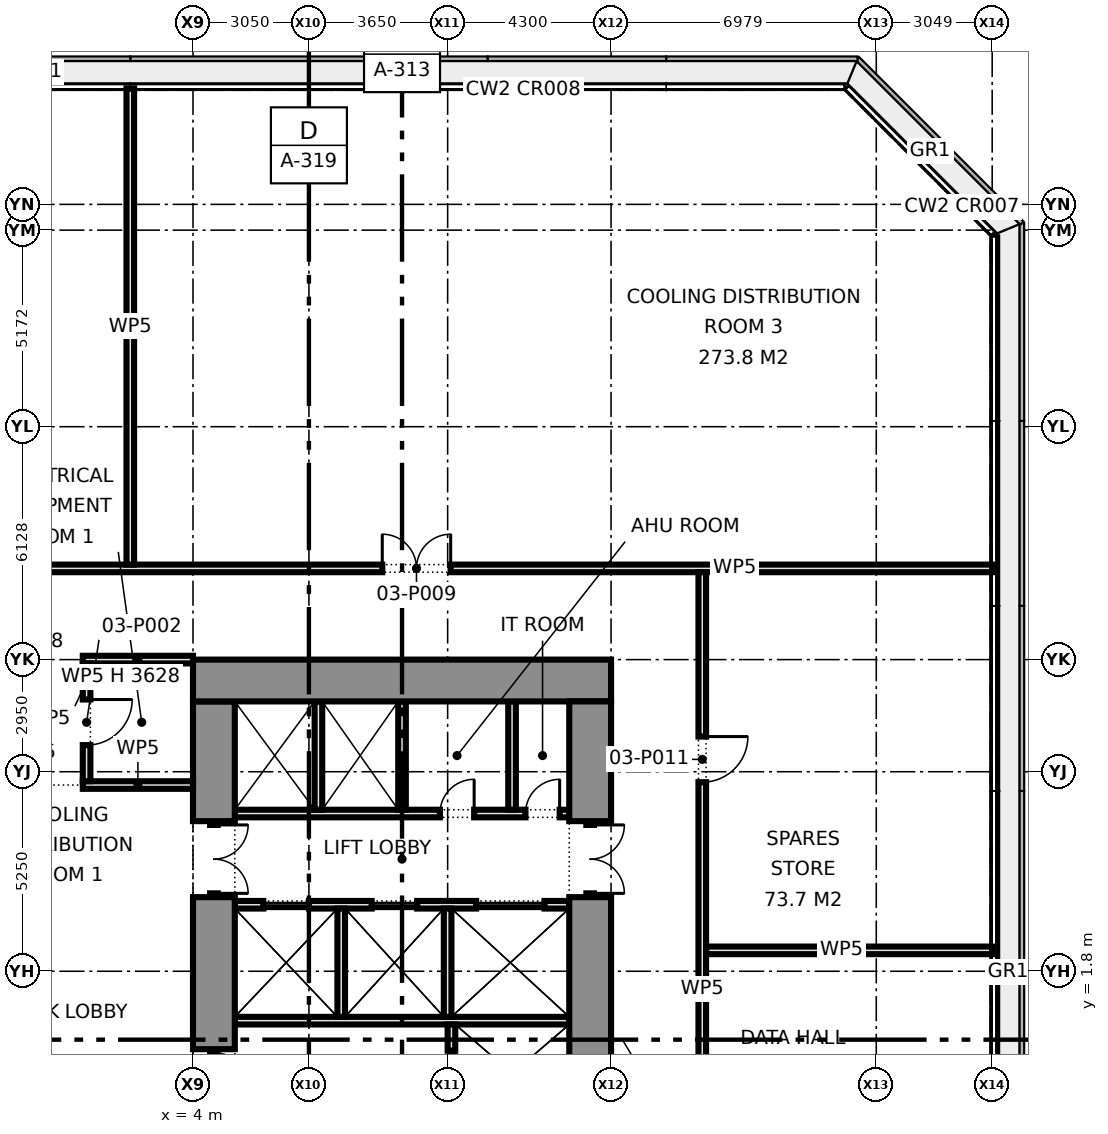
"""IFC4 building model, lengths in metres.
Left out: names, types, materials, properties, quantities, classifications, styles, units other than length and angle.
Written with IfcOpenShell. Run it as: python <this file> out.ifc"""

import sys

from ifc_helpers import new_model, si_unit, direction, frame, frame_2d, origin, place, context, subcontext, project, spatial, rectangle, extrude, element, fill, save


model = new_model("IFC4")
c1 = context("Model", 3, precision=1e-05, world=origin(), true_north=direction((0.0, 1.0)))
c2 = subcontext(c1, "Body", "Model", "MODEL_VIEW")
j1 = project(units=[si_unit("LENGTHUNIT", "METRE"), si_unit("PLANEANGLEUNIT", "RADIAN")], contexts=[c1])
p1 = place(None, origin())
s1 = spatial("IfcSite", under=j1, at=p1, CompositionType="ELEMENT")
p2 = place(p1, origin())
s2 = spatial("IfcBuilding", under=s1, at=p2, CompositionType="ELEMENT")
p3 = place(p2, frame((0.0, 0.0, 11.3)))
s3 = spatial("IfcBuildingStorey", under=s2, at=p3, CompositionType="ELEMENT", Elevation=11.3)
p4 = place(p3, frame((15.0, 9.45, 0.0), z_axis=(0.0, 0.0, 1.0), x_axis=(-1.0, 0.0, 0.0)))
e1 = element("IfcWall", 1, at=p4, inside=s3, PredefinedType="SHEAR", context=c2, shape_type="SweptSolid", body=[
    extrude(rectangle(XDim=11.0, YDim=1.1, at=frame_2d((5.5, 0.0))), origin(), (0.0, 0.0, 1.0), 4.575),
])
p5 = place(p3, frame((14.45, 8.9, 0.0), z_axis=(0.0, 0.0, 1.0), x_axis=(0.0, -1.0, 0.0)))
e2 = element("IfcWall", 2, at=p5, inside=s3, PredefinedType="SHEAR", context=c2, shape_type="SweptSolid", body=[
    extrude(rectangle(XDim=3.15, YDim=1.1, at=frame_2d((1.575, 0.0))), origin(), (0.0, 0.0, 1.0), 4.575),
])
p6 = place(p3, frame((14.45, 5.75, 0.0), z_axis=(0.0, 0.0, 1.0), x_axis=(0.0, -1.0, 0.0)))
e3 = element("IfcWall", 3, at=p6, inside=s3, PredefinedType="PARTITIONING", context=c2, shape_type="SweptSolid", body=[
    extrude(rectangle(XDim=2.0, YDim=0.2, at=frame_2d((1.0, 0.0))), origin(), (0.0, 0.0, 1.0), 2.4),
])
p7 = place(p6, frame((0.1, 0.0, 0.0)))
e4 = element("IfcOpeningElement", 4, at=p7, cuts=e3, PredefinedType="OPENING", context=c2, shape_type="SweptSolid", body=[
    extrude(rectangle(XDim=1.8, YDim=2.1, at=frame_2d((0.9, 1.05))), frame((0.0, 0.11, 0.0), z_axis=(0.0, -1.0, 0.0), x_axis=(1.0, 0.0, 0.0)), (0.0, 0.0, 1.0), 0.22),
])
p8 = place(p3, frame((14.45, 3.75, 0.0), z_axis=(0.0, 0.0, 1.0), x_axis=(0.0, -1.0, 0.0)))
e5 = element("IfcWall", 5, at=p8, inside=s3, PredefinedType="SHEAR", context=c2, shape_type="SweptSolid", body=[
    extrude(rectangle(XDim=6.13, YDim=1.1, at=frame_2d((3.065, 0.0))), origin(), (0.0, 0.0, 1.0), 4.575),
])
p9 = place(p3, frame((4.55, 8.9, 0.0), z_axis=(0.0, 0.0, 1.0), x_axis=(0.0, -1.0, 0.0)))
e6 = element("IfcWall", 6, at=p9, inside=s3, PredefinedType="SHEAR", context=c2, shape_type="SweptSolid", body=[
    extrude(rectangle(XDim=3.15, YDim=1.1, at=frame_2d((1.575, 0.0))), origin(), (0.0, 0.0, 1.0), 4.575),
])
p10 = place(p3, frame((4.55, 5.75, 0.0), z_axis=(0.0, 0.0, 1.0), x_axis=(0.0, -1.0, 0.0)))
e7 = element("IfcWall", 7, at=p10, inside=s3, PredefinedType="PARTITIONING", context=c2, shape_type="SweptSolid", body=[
    extrude(rectangle(XDim=2.0, YDim=0.2, at=frame_2d((1.0, 0.0))), origin(), (0.0, 0.0, 1.0), 2.4),
])
p11 = place(p10, frame((0.1, 0.0, 0.0)))
e8 = element("IfcOpeningElement", 8, at=p11, cuts=e7, PredefinedType="OPENING", context=c2, shape_type="SweptSolid", body=[
    extrude(rectangle(XDim=1.8, YDim=2.1, at=frame_2d((0.9, 1.05))), frame((0.0, 0.11, 0.0), z_axis=(0.0, -1.0, 0.0), x_axis=(1.0, 0.0, 0.0)), (0.0, 0.0, 1.0), 0.22),
])
p12 = place(p3, frame((4.55, 3.75, 0.0), z_axis=(0.0, 0.0, 1.0), x_axis=(0.0, -1.0, 0.0)))
e9 = element("IfcWall", 9, at=p12, inside=s3, PredefinedType="SHEAR", context=c2, shape_type="SweptSolid", body=[
    extrude(rectangle(XDim=4.0, YDim=1.1, at=frame_2d((2.0, 0.0))), origin(), (0.0, 0.0, 1.0), 4.575),
])
p13 = place(p3, frame((4.55, -0.25, 0.0), z_axis=(0.0, 0.0, 1.0), x_axis=(0.0, -1.0, 0.0)))
e10 = element("IfcWall", 10, at=p13, inside=s3, PredefinedType="PARTITIONING", context=c2, shape_type="SweptSolid", body=[
    extrude(rectangle(XDim=1.3, YDim=0.2, at=frame_2d((0.65, 0.0))), origin(), (0.0, 0.0, 1.0), 2.4),
])
p14 = place(p13, frame((0.1, 0.0, 0.0)))
e11 = element("IfcOpeningElement", 11, at=p14, cuts=e10, PredefinedType="OPENING", context=c2, shape_type="SweptSolid", body=[
    extrude(rectangle(XDim=1.1, YDim=2.1, at=frame_2d((0.55, 1.05))), frame((0.0, 0.11, 0.0), z_axis=(0.0, -1.0, 0.0), x_axis=(1.0, 0.0, 0.0)), (0.0, 0.0, 1.0), 0.22),
])
p15 = place(p3, frame((13.9, 5.95, 0.0), z_axis=(0.0, 0.0, 1.0), x_axis=(-1.0, 0.0, 0.0)))
e12 = element("IfcWall", 12, at=p15, inside=s3, PredefinedType="PARTITIONING", context=c2, shape_type="SweptSolid", body=[
    extrude(rectangle(XDim=8.8, YDim=0.2, at=frame_2d((4.4, 0.0))), origin(), (0.0, 0.0, 1.0), 4.575),
])
p16 = place(p15, frame((0.252, 0.0, 0.0)))
e13 = element("IfcOpeningElement", 13, at=p16, cuts=e12, PredefinedType="OPENING", context=c2, shape_type="SweptSolid", body=[
    extrude(rectangle(XDim=0.9, YDim=2.1, at=frame_2d((0.45, 1.05))), frame((0.0, 0.11, 0.0), z_axis=(0.0, -1.0, 0.0), x_axis=(1.0, 0.0, 0.0)), (0.0, 0.0, 1.0), 0.22),
])
p17 = place(p15, frame((2.502, 0.0, 0.0)))
e14 = element("IfcOpeningElement", 14, at=p17, cuts=e12, PredefinedType="OPENING", context=c2, shape_type="SweptSolid", body=[
    extrude(rectangle(XDim=0.9, YDim=2.1, at=frame_2d((0.45, 1.05))), frame((0.0, 0.11, 0.0), z_axis=(0.0, -1.0, 0.0), x_axis=(1.0, 0.0, 0.0)), (0.0, 0.0, 1.0), 0.22),
])
p18 = place(p3, frame((13.9, 3.55, 0.0), z_axis=(0.0, 0.0, 1.0), x_axis=(-1.0, 0.0, 0.0)))
e15 = element("IfcWall", 15, at=p18, inside=s3, PredefinedType="PARTITIONING", context=c2, shape_type="SweptSolid", body=[
    extrude(rectangle(XDim=8.8, YDim=0.2, at=frame_2d((4.4, 0.0))), origin(), (0.0, 0.0, 1.0), 4.575),
])
p19 = place(p18, frame((0.65, 0.0, 0.0)))
e16 = element("IfcOpeningElement", 16, at=p19, cuts=e15, PredefinedType="OPENING", context=c2, shape_type="SweptSolid", body=[
    extrude(rectangle(XDim=1.8, YDim=2.1, at=frame_2d((0.9, 1.05))), frame((0.0, 0.11, 0.0), z_axis=(0.0, -1.0, 0.0), x_axis=(1.0, 0.0, 0.0)), (0.0, 0.0, 1.0), 0.22),
])
p20 = place(p18, frame((4.0, 0.0, 0.0)))
e17 = element("IfcOpeningElement", 17, at=p20, cuts=e15, PredefinedType="OPENING", context=c2, shape_type="SweptSolid", body=[
    extrude(rectangle(XDim=1.2, YDim=2.1, at=frame_2d((0.6, 1.05))), frame((0.0, 0.11, 0.0), z_axis=(0.0, -1.0, 0.0), x_axis=(1.0, 0.0, 0.0)), (0.0, 0.0, 1.0), 0.22),
])
p21 = place(p18, frame((6.85, 0.0, 0.0)))
e18 = element("IfcOpeningElement", 18, at=p21, cuts=e15, PredefinedType="OPENING", context=c2, shape_type="SweptSolid", body=[
    extrude(rectangle(XDim=1.2, YDim=2.1, at=frame_2d((0.6, 1.05))), frame((0.0, 0.11, 0.0), z_axis=(0.0, -1.0, 0.0), x_axis=(1.0, 0.0, 0.0)), (0.0, 0.0, 1.0), 0.22),
])
p22 = place(p3, frame((13.9, 0.5, 0.0), z_axis=(0.0, 0.0, 1.0), x_axis=(-1.0, 0.0, 0.0)))
e19 = element("IfcWall", 19, at=p22, inside=s3, PredefinedType="PARTITIONING", context=c2, shape_type="SweptSolid", body=[
    extrude(rectangle(XDim=8.8, YDim=0.2, at=frame_2d((4.4, 0.0))), origin(), (0.0, 0.0, 1.0), 4.575),
])
p23 = place(p3, frame((10.8, 0.4, 0.0), z_axis=(0.0, 0.0, 1.0), x_axis=(0.0, -1.0, 0.0)))
e20 = element("IfcWall", 20, at=p23, inside=s3, PredefinedType="PARTITIONING", context=c2, shape_type="SweptSolid", body=[
    extrude(rectangle(XDim=2.58, YDim=0.2, at=frame_2d((1.29, 0.0))), origin(), (0.0, 0.0, 1.0), 4.575),
])
p24 = place(p23, frame((0.69, 0.0, 0.0)))
e21 = element("IfcOpeningElement", 21, at=p24, cuts=e20, PredefinedType="OPENING", context=c2, shape_type="SweptSolid", body=[
    extrude(rectangle(XDim=1.2, YDim=2.1, at=frame_2d((0.6, 1.05))), frame((0.0, 0.11, 0.0), z_axis=(0.0, -1.0, 0.0), x_axis=(1.0, 0.0, 0.0)), (0.0, 0.0, 1.0), 0.22),
])
for number, where, z_axis, x_axis in (
    (22, (9.5, 8.9, 0.0), (0.0, 0.0, 1.0), (0.0, -1.0, 0.0)),
    (23, (7.3, 8.9, 0.0), (0.0, 0.0, 1.0), (0.0, -1.0, 0.0)),
    (24, (12.395, 8.9, 0.0), (0.0, 0.0, 1.0), (0.0, -1.0, 0.0)),
    (25, (10.7, 3.45, 0.0), (0.0, 0.0, 1.0), (0.0, -1.0, 0.0)),
    (26, (7.9, 3.45, 0.0), (0.0, 0.0, 1.0), (0.0, -1.0, 0.0)),
):
    element("IfcWall", number, at=place(p3, frame(where, z_axis=z_axis, x_axis=x_axis)), inside=s3, PredefinedType="PARTITIONING", context=c2, shape_type="SweptSolid", body=[
        extrude(rectangle(XDim=2.85, YDim=0.2, at=frame_2d((1.425, 0.0))), origin(), (0.0, 0.0, 1.0), 4.575),
    ])
p25 = place(p3, frame((17.5, 2.35, 0.0), z_axis=(0.0, 0.0, 1.0), x_axis=(1.0, 0.0, 0.0)))
e27 = element("IfcWall", 27, at=p25, inside=s3, PredefinedType="PARTITIONING", context=c2, shape_type="SweptSolid", body=[
    extrude(rectangle(XDim=7.53, YDim=0.2, at=frame_2d((3.765, 0.0))), origin(), (0.0, 0.0, 1.0), 4.575),
])
p26 = place(p3, frame((1.1, 6.7, 0.0), z_axis=(0.0, 0.0, 1.0), x_axis=(1.0, 0.0, 0.0)))
e28 = element("IfcWall", 28, at=p26, inside=s3, PredefinedType="PARTITIONING", context=c2, shape_type="SweptSolid", body=[
    extrude(rectangle(XDim=2.9, YDim=0.2, at=frame_2d((1.45, 0.0))), origin(), (0.0, 0.0, 1.0), 4.575),
])
p27 = place(p3, frame((1.1, 10.0, 0.0), z_axis=(0.0, 0.0, 1.0), x_axis=(1.0, 0.0, 0.0)))
e29 = element("IfcWall", 29, at=p27, inside=s3, PredefinedType="PARTITIONING", context=c2, shape_type="SweptSolid", body=[
    extrude(rectangle(XDim=2.9, YDim=0.2, at=frame_2d((1.45, 0.0))), origin(), (0.0, 0.0, 1.0), 3.627),
])
p28 = place(p3, frame((-25.03, 12.4, 0.0), z_axis=(0.0, 0.0, 1.0), x_axis=(1.0, 0.0, 0.0)))
e30 = element("IfcWall", 30, at=p28, inside=s3, PredefinedType="PARTITIONING", context=c2, shape_type="SweptSolid", body=[
    extrude(rectangle(XDim=50.06, YDim=0.2, at=frame_2d((25.03, 0.0))), origin(), (0.0, 0.0, 1.0), 4.575),
])
p29 = place(p28, frame((21.18, 0.0, 0.0)))
e31 = element("IfcOpeningElement", 31, at=p29, cuts=e30, PredefinedType="OPENING", context=c2, shape_type="SweptSolid", body=[
    extrude(rectangle(XDim=1.8, YDim=2.1, at=frame_2d((0.9, 1.05))), frame((0.0, 0.11, 0.0), z_axis=(0.0, -1.0, 0.0), x_axis=(1.0, 0.0, 0.0)), (0.0, 0.0, 1.0), 0.22),
])
p30 = place(p28, frame((9.58, 0.0, 0.0)))
e32 = element("IfcOpeningElement", 32, at=p30, cuts=e30, PredefinedType="OPENING", context=c2, shape_type="SweptSolid", body=[
    extrude(rectangle(XDim=1.0, YDim=2.1, at=frame_2d((0.5, 1.05))), frame((0.0, 0.11, 0.0), z_axis=(0.0, -1.0, 0.0), x_axis=(1.0, 0.0, 0.0)), (0.0, 0.0, 1.0), 0.22),
])
p31 = place(p28, frame((12.58, 0.0, 0.0)))
e33 = element("IfcOpeningElement", 33, at=p31, cuts=e30, PredefinedType="OPENING", context=c2, shape_type="SweptSolid", body=[
    extrude(rectangle(XDim=1.0, YDim=2.1, at=frame_2d((0.5, 1.05))), frame((0.0, 0.11, 0.0), z_axis=(0.0, -1.0, 0.0), x_axis=(1.0, 0.0, 0.0)), (0.0, 0.0, 1.0), 0.22),
])
p32 = place(p28, frame((15.18, 0.0, 0.0)))
e34 = element("IfcOpeningElement", 34, at=p32, cuts=e30, PredefinedType="OPENING", context=c2, shape_type="SweptSolid", body=[
    extrude(rectangle(XDim=1.0, YDim=2.1, at=frame_2d((0.5, 1.05))), frame((0.0, 0.11, 0.0), z_axis=(0.0, -1.0, 0.0), x_axis=(1.0, 0.0, 0.0)), (0.0, 0.0, 1.0), 0.22),
])
p33 = place(p28, frame((34.01, 0.0, 0.0)))
e35 = element("IfcOpeningElement", 35, at=p33, cuts=e30, PredefinedType="OPENING", context=c2, shape_type="SweptSolid", body=[
    extrude(rectangle(XDim=1.8, YDim=2.1, at=frame_2d((0.9, 1.05))), frame((0.0, 0.11, 0.0), z_axis=(0.0, -1.0, 0.0), x_axis=(1.0, 0.0, 0.0)), (0.0, 0.0, 1.0), 0.22),
])
p34 = place(p3, frame((17.4, -12.3, 0.0), z_axis=(0.0, 0.0, 1.0), x_axis=(0.0, 1.0, 0.0)))
e36 = element("IfcWall", 36, at=p34, inside=s3, PredefinedType="PARTITIONING", context=c2, shape_type="SweptSolid", body=[
    extrude(rectangle(XDim=24.6, YDim=0.2, at=frame_2d((12.3, 0.0))), origin(), (0.0, 0.0, 1.0), 4.575),
])
p35 = place(p34, frame((6.375, 0.0, 0.0)))
e37 = element("IfcOpeningElement", 37, at=p35, cuts=e36, PredefinedType="OPENING", context=c2, shape_type="SweptSolid", body=[
    extrude(rectangle(XDim=1.8, YDim=2.1, at=frame_2d((0.9, 1.05))), frame((0.0, 0.11, 0.0), z_axis=(0.0, -1.0, 0.0), x_axis=(1.0, 0.0, 0.0)), (0.0, 0.0, 1.0), 0.22),
])
p36 = place(p34, frame((19.075, 0.0, 0.0)))
e38 = element("IfcOpeningElement", 38, at=p36, cuts=e36, PredefinedType="OPENING", context=c2, shape_type="SweptSolid", body=[
    extrude(rectangle(XDim=1.2, YDim=2.1, at=frame_2d((0.6, 1.05))), frame((0.0, 0.11, 0.0), z_axis=(0.0, -1.0, 0.0), x_axis=(1.0, 0.0, 0.0)), (0.0, 0.0, 1.0), 0.22),
])
p37 = place(p3, frame((2.35, 12.5, 0.0), z_axis=(0.0, 0.0, 1.0), x_axis=(0.0, 1.0, 0.0)))
e39 = element("IfcWall", 39, at=p37, inside=s3, PredefinedType="PARTITIONING", context=c2, shape_type="SweptSolid", body=[
    extrude(rectangle(XDim=12.53, YDim=0.2, at=frame_2d((6.265, 0.0))), origin(), (0.0, 0.0, 1.0), 4.575),
])
p38 = place(p3, frame((1.2, 6.8, 0.0), z_axis=(0.0, 0.0, 1.0), x_axis=(0.0, 1.0, 0.0)))
e40 = element("IfcWall", 40, at=p38, inside=s3, PredefinedType="PARTITIONING", context=c2, shape_type="SweptSolid", body=[
    extrude(rectangle(XDim=3.1, YDim=0.2, at=frame_2d((1.55, 0.0))), origin(), (0.0, 0.0, 1.0), 4.575),
])
p39 = place(p38, frame((0.95, 0.0, 0.0)))
e41 = element("IfcOpeningElement", 41, at=p39, cuts=e40, PredefinedType="OPENING", context=c2, shape_type="SweptSolid", body=[
    extrude(rectangle(XDim=1.2, YDim=2.1, at=frame_2d((0.6, 1.05))), frame((0.0, 0.11, 0.0), z_axis=(0.0, -1.0, 0.0), x_axis=(1.0, 0.0, 0.0)), (0.0, 0.0, 1.0), 0.22),
])
p40 = place(p7, origin())
e42 = element("IfcDoor", 42, at=p40, inside=s3, OperationType="DOUBLE_DOOR_SINGLE_SWING", PredefinedType="DOOR", context=c2, shape_type="SweptSolid", body=[
    extrude(rectangle(XDim=1.8, YDim=2.1, at=frame_2d((0.9, 1.05))), frame((0.0, 0.025, 0.0), z_axis=(0.0, -1.0, 0.0), x_axis=(1.0, 0.0, 0.0)), (0.0, 0.0, 1.0), 0.05),
])
fill(e4, e42)
p41 = place(p11, origin())
e43 = element("IfcDoor", 43, at=p41, inside=s3, OperationType="DOUBLE_DOOR_SINGLE_SWING", PredefinedType="DOOR", context=c2, shape_type="SweptSolid", body=[
    extrude(rectangle(XDim=1.8, YDim=2.1, at=frame_2d((0.9, 1.05))), frame((0.0, 0.025, 0.0), z_axis=(0.0, -1.0, 0.0), x_axis=(1.0, 0.0, 0.0)), (0.0, 0.0, 1.0), 0.05),
])
fill(e8, e43)
p42 = place(p14, origin())
e44 = element("IfcDoor", 44, at=p42, inside=s3, OperationType="SINGLE_SWING_RIGHT", PredefinedType="DOOR", context=c2, shape_type="SweptSolid", body=[
    extrude(rectangle(XDim=1.1, YDim=2.1, at=frame_2d((0.55, 1.05))), frame((0.0, 0.025, 0.0), z_axis=(0.0, -1.0, 0.0), x_axis=(1.0, 0.0, 0.0)), (0.0, 0.0, 1.0), 0.05),
])
fill(e11, e44)
p43 = place(p19, origin())
e45 = element("IfcDoor", 45, at=p43, inside=s3, OperationType="DOUBLE_DOOR_SLIDING", PredefinedType="DOOR", context=c2, shape_type="SweptSolid", body=[
    extrude(rectangle(XDim=1.8, YDim=2.1, at=frame_2d((0.9, 1.05))), frame((0.0, 0.025, 0.0), z_axis=(0.0, -1.0, 0.0), x_axis=(1.0, 0.0, 0.0)), (0.0, 0.0, 1.0), 0.05),
])
fill(e16, e45)
p44 = place(p20, origin())
e46 = element("IfcDoor", 46, at=p44, inside=s3, OperationType="DOUBLE_DOOR_SLIDING", PredefinedType="DOOR", context=c2, shape_type="SweptSolid", body=[
    extrude(rectangle(XDim=1.2, YDim=2.1, at=frame_2d((0.6, 1.05))), frame((0.0, 0.025, 0.0), z_axis=(0.0, -1.0, 0.0), x_axis=(1.0, 0.0, 0.0)), (0.0, 0.0, 1.0), 0.05),
])
fill(e17, e46)
p45 = place(p21, origin())
e47 = element("IfcDoor", 47, at=p45, inside=s3, OperationType="DOUBLE_DOOR_SLIDING", PredefinedType="DOOR", context=c2, shape_type="SweptSolid", body=[
    extrude(rectangle(XDim=1.2, YDim=2.1, at=frame_2d((0.6, 1.05))), frame((0.0, 0.025, 0.0), z_axis=(0.0, -1.0, 0.0), x_axis=(1.0, 0.0, 0.0)), (0.0, 0.0, 1.0), 0.05),
])
fill(e18, e47)
p46 = place(p24, origin())
e48 = element("IfcDoor", 48, at=p46, inside=s3, OperationType="DOUBLE_DOOR_SLIDING", PredefinedType="DOOR", context=c2, shape_type="SweptSolid", body=[
    extrude(rectangle(XDim=1.2, YDim=2.1, at=frame_2d((0.6, 1.05))), frame((0.0, 0.025, 0.0), z_axis=(0.0, -1.0, 0.0), x_axis=(1.0, 0.0, 0.0)), (0.0, 0.0, 1.0), 0.05),
])
fill(e21, e48)
p47 = place(p16, frame((0.9, 0.0, 0.0), z_axis=(0.0, 0.0, 1.0), x_axis=(-1.0, 0.0, 0.0)))
e49 = element("IfcDoor", 49, at=p47, inside=s3, OperationType="SINGLE_SWING_RIGHT", PredefinedType="DOOR", context=c2, shape_type="SweptSolid", body=[
    extrude(rectangle(XDim=0.9, YDim=2.1, at=frame_2d((0.45, 1.05))), frame((0.0, 0.025, 0.0), z_axis=(0.0, -1.0, 0.0), x_axis=(1.0, 0.0, 0.0)), (0.0, 0.0, 1.0), 0.05),
])
fill(e13, e49)
p48 = place(p17, frame((0.9, 0.0, 0.0), z_axis=(0.0, 0.0, 1.0), x_axis=(-1.0, 0.0, 0.0)))
e50 = element("IfcDoor", 50, at=p48, inside=s3, OperationType="SINGLE_SWING_RIGHT", PredefinedType="DOOR", context=c2, shape_type="SweptSolid", body=[
    extrude(rectangle(XDim=0.9, YDim=2.1, at=frame_2d((0.45, 1.05))), frame((0.0, 0.025, 0.0), z_axis=(0.0, -1.0, 0.0), x_axis=(1.0, 0.0, 0.0)), (0.0, 0.0, 1.0), 0.05),
])
fill(e14, e50)
p49 = place(p39, frame((1.2, 0.0, 0.0), z_axis=(0.0, 0.0, 1.0), x_axis=(-1.0, 0.0, 0.0)))
e51 = element("IfcDoor", 51, at=p49, inside=s3, OperationType="SINGLE_SWING_LEFT", PredefinedType="DOOR", context=c2, shape_type="SweptSolid", body=[
    extrude(rectangle(XDim=1.2, YDim=2.1, at=frame_2d((0.6, 1.05))), frame((0.0, 0.025, 0.0), z_axis=(0.0, -1.0, 0.0), x_axis=(1.0, 0.0, 0.0)), (0.0, 0.0, 1.0), 0.05),
])
fill(e41, e51)
p50 = place(p33, origin())
e52 = element("IfcDoor", 52, at=p50, inside=s3, OperationType="DOUBLE_DOOR_SINGLE_SWING", PredefinedType="DOOR", context=c2, shape_type="SweptSolid", body=[
    extrude(rectangle(XDim=1.8, YDim=2.1, at=frame_2d((0.9, 1.05))), frame((0.0, 0.025, 0.0), z_axis=(0.0, -1.0, 0.0), x_axis=(1.0, 0.0, 0.0)), (0.0, 0.0, 1.0), 0.05),
])
fill(e35, e52)
p51 = place(p36, frame((1.2, 0.0, 0.0), z_axis=(0.0, 0.0, 1.0), x_axis=(-1.0, 0.0, 0.0)))
e53 = element("IfcDoor", 53, at=p51, inside=s3, OperationType="SINGLE_SWING_LEFT", PredefinedType="DOOR", context=c2, shape_type="SweptSolid", body=[
    extrude(rectangle(XDim=1.2, YDim=2.1, at=frame_2d((0.6, 1.05))), frame((0.0, 0.025, 0.0), z_axis=(0.0, -1.0, 0.0), x_axis=(1.0, 0.0, 0.0)), (0.0, 0.0, 1.0), 0.05),
])
fill(e38, e53)
save(model, sys.argv[1])
